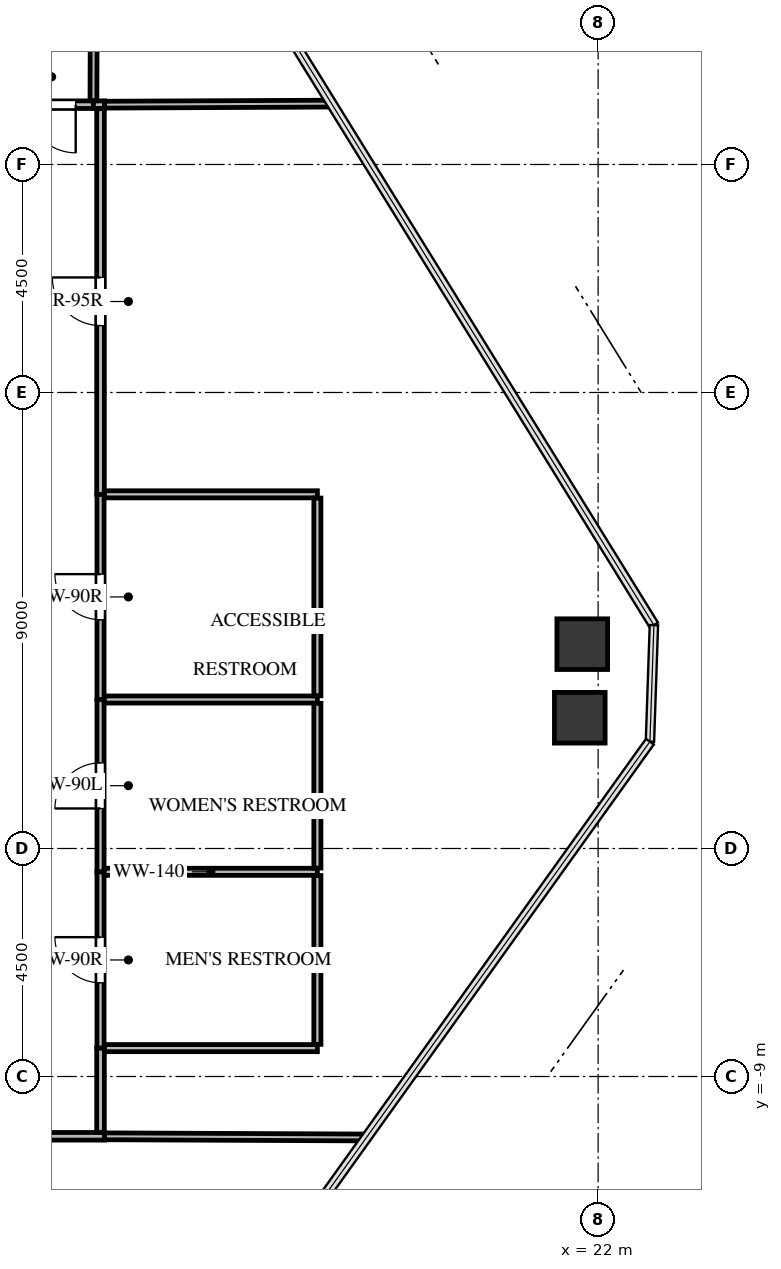
"""IFC4 building model, lengths in metres.
Left out: names, types, materials, properties, quantities, classifications, styles, units other than length and angle.
Written with IfcOpenShell. Run it as: python <this file> out.ifc"""

import sys

from ifc_helpers import new_model, si_unit, direction, frame, frame_2d, origin, origin_2d, place, context, subcontext, project, spatial, rectangle, extrude, source, transform, mapped, element, fill, save


model = new_model("IFC4")
c1 = context("Model", 3, precision=1e-05, world=origin(), true_north=direction((0.0, 1.0)))
c2 = subcontext(c1, "Body", "Model", "MODEL_VIEW")
j1 = project(units=[si_unit("LENGTHUNIT", "METRE"), si_unit("PLANEANGLEUNIT", "RADIAN")], contexts=[c1])
p1 = place(None, origin())
s1 = spatial("IfcSite", under=j1, at=p1, CompositionType="ELEMENT")
p2 = place(p1, origin())
s2 = spatial("IfcBuilding", under=s1, at=p2, CompositionType="ELEMENT")
p3 = place(p2, frame((0.0, 0.0, 209.2)))
s3 = spatial("IfcBuildingStorey", under=s2, at=p3, CompositionType="ELEMENT", Elevation=209.2)
m1 = source(origin(), c2, "Body", "SweptSolid", [
    extrude(rectangle(XDim=1.0, YDim=1.0, at=origin_2d()), origin(), (0.0, 0.0, 1.0), 4.14),
])
for number, where, z_axis, x_axis in (
    (1, (21.687, -0.467, -0.24), (0.0, 0.0, 1.0), (1.0, 0.0, 0.0)),
    (2, (21.638, -1.92, -0.24), (0.0, 0.0, 1.0), (1.0, 0.0, 0.0)),
):
    element("IfcColumn", number, at=place(p3, frame(where, z_axis=z_axis, x_axis=x_axis)), inside=s3, PredefinedType="COLUMN", context=c2, shape_type="MappedRepresentation", body=[
        mapped(m1, transform((0.0, 0.0, 0.0), x_axis=(1.0, 0.0, 0.0), y_axis=(0.0, 1.0, 0.0), z_axis=(0.0, 0.0, 1.0), scale=1.0)),
    ])
p4 = place(p3, frame((12.18, -8.44, 0.0), z_axis=(0.0, 0.0, 1.0), x_axis=(0.0, 1.0, 0.0)))
e3 = element("IfcWall", 3, at=p4, inside=s3, PredefinedType="PARTITIONING", context=c2, shape_type="SweptSolid", body=[
    extrude(rectangle(XDim=3.48, YDim=0.14, at=frame_2d((1.74, 0.0))), origin(), (0.0, 0.0, 1.0), 3.885),
])
p5 = place(p4, frame((1.29, 0.0, 0.0)))
e4 = element("IfcOpeningElement", 4, at=p5, cuts=e3, PredefinedType="OPENING", context=c2, shape_type="SweptSolid", body=[
    extrude(rectangle(XDim=0.9, YDim=2.05, at=frame_2d((0.45, 1.025))), frame((0.0, 0.08, 0.0), z_axis=(0.0, -1.0, 0.0), x_axis=(1.0, 0.0, 0.0)), (0.0, 0.0, 1.0), 0.16),
])
p6 = place(p3, frame((12.18, -4.96, 0.0), z_axis=(0.0, 0.0, 1.0), x_axis=(0.0, 1.0, 0.0)))
e5 = element("IfcWall", 5, at=p6, inside=s3, PredefinedType="PARTITIONING", context=c2, shape_type="SweptSolid", body=[
    extrude(rectangle(XDim=3.4, YDim=0.14, at=frame_2d((1.7, 0.0))), origin(), (0.0, 0.0, 1.0), 3.885),
])
p7 = place(p6, frame((1.25, 0.0, 0.0)))
e6 = element("IfcOpeningElement", 6, at=p7, cuts=e5, PredefinedType="OPENING", context=c2, shape_type="SweptSolid", body=[
    extrude(rectangle(XDim=0.9, YDim=2.05, at=frame_2d((0.45, 1.025))), frame((0.0, 0.08, 0.0), z_axis=(0.0, -1.0, 0.0), x_axis=(1.0, 0.0, 0.0)), (0.0, 0.0, 1.0), 0.16),
])
p8 = place(p3, frame((12.18, -1.56, 0.0), z_axis=(0.0, 0.0, 1.0), x_axis=(0.0, 1.0, 0.0)))
e7 = element("IfcWall", 7, at=p8, inside=s3, PredefinedType="PARTITIONING", context=c2, shape_type="SweptSolid", body=[
    extrude(rectangle(XDim=4.05, YDim=0.14, at=frame_2d((2.025, 0.0))), origin(), (0.0, 0.0, 1.0), 2.47),
])
p9 = place(p8, frame((1.575, 0.0, 0.0)))
e8 = element("IfcOpeningElement", 8, at=p9, cuts=e7, PredefinedType="OPENING", context=c2, shape_type="SweptSolid", body=[
    extrude(rectangle(XDim=0.9, YDim=2.05, at=frame_2d((0.45, 1.025))), frame((0.0, 0.08, 0.0), z_axis=(0.0, -1.0, 0.0), x_axis=(1.0, 0.0, 0.0)), (0.0, 0.0, 1.0), 0.16),
])
p10 = place(p3, frame((12.04, 10.18, 0.0), z_axis=(0.0, 0.0, 1.0), x_axis=(-1.0, 0.0, 0.0)))
e9 = element("IfcWall", 9, at=p10, inside=s3, PredefinedType="PARTITIONING", context=c2, shape_type="SweptSolid", body=[
    extrude(rectangle(XDim=4.8, YDim=0.15, at=frame_2d((2.4, 0.0))), origin(), (0.0, 0.0, 1.0), 2.47),
])
p11 = place(p10, frame((0.35, 0.0, 0.0)))
e10 = element("IfcOpeningElement", 10, at=p11, cuts=e9, PredefinedType="OPENING", context=c2, shape_type="SweptSolid", body=[
    extrude(rectangle(XDim=0.95, YDim=2.1, at=frame_2d((0.475, 1.05))), frame((0.0, 0.085, 0.0), z_axis=(0.0, -1.0, 0.0), x_axis=(1.0, 0.0, 0.0)), (0.0, 0.0, 1.0), 0.17),
])
p12 = place(p3, frame((12.26, 10.18, 0.0), z_axis=(0.0, 0.0, 1.0), x_axis=(-1.0, 0.0, 0.0)))
e11 = element("IfcWall", 11, at=p12, inside=s3, PredefinedType="PARTITIONING", context=c2, shape_type="SweptSolid", body=[
    extrude(rectangle(XDim=0.22, YDim=0.15, at=frame_2d((0.11, 0.0))), origin(), (0.0, 0.0, 1.0), 3.885),
])
p13 = place(p3, frame((5.04, -10.18, 0.0), z_axis=(0.0, 0.0, 1.0), x_axis=(1.0, 0.0, 0.0)))
e12 = element("IfcWall", 12, at=p13, inside=s3, PredefinedType="PARTITIONING", context=c2, shape_type="SweptSolid", body=[
    extrude(rectangle(XDim=7.22, YDim=0.15, at=frame_2d((3.61, 0.0))), origin(), (0.0, 0.0, 1.0), 2.47),
])
p14 = place(p13, frame((3.15, 0.0, 0.0)))
e13 = element("IfcOpeningElement", 13, at=p14, cuts=e12, PredefinedType="OPENING", context=c2, shape_type="SweptSolid", body=[
    extrude(rectangle(XDim=0.92, YDim=2.1, at=frame_2d((0.46, 1.05))), frame((0.0, 0.085, 0.0), z_axis=(0.0, -1.0, 0.0), x_axis=(1.0, 0.0, 0.0)), (0.0, 0.0, 1.0), 0.17),
])
p15 = place(p3, frame((12.18, 2.49, 0.0), z_axis=(0.0, 0.0, 1.0), x_axis=(0.0, 1.0, 0.0)))
e14 = element("IfcWall", 14, at=p15, inside=s3, PredefinedType="PARTITIONING", context=c2, shape_type="SweptSolid", body=[
    extrude(rectangle(XDim=7.611, YDim=0.15, at=frame_2d((3.806, 0.0))), origin(), (0.0, 0.0, 1.0), 3.885),
])
p16 = place(p15, frame((3.331, 0.0, 0.0)))
e15 = element("IfcOpeningElement", 15, at=p16, cuts=e14, PredefinedType="OPENING", context=c2, shape_type="SweptSolid", body=[
    extrude(rectangle(XDim=0.95, YDim=2.1, at=frame_2d((0.475, 1.05))), frame((0.0, 0.085, 0.0), z_axis=(0.0, -1.0, 0.0), x_axis=(1.0, 0.0, 0.0)), (0.0, 0.0, 1.0), 0.17),
])
p17 = place(p3, frame((12.18, -10.101, 0.0), z_axis=(0.0, 0.0, 1.0), x_axis=(0.0, 1.0, 0.0)))
e16 = element("IfcWall", 16, at=p17, inside=s3, PredefinedType="PARTITIONING", context=c2, shape_type="SweptSolid", body=[
    extrude(rectangle(XDim=1.661, YDim=0.15, at=frame_2d((0.831, 0.0))), origin(), (0.0, 0.0, 1.0), 3.885),
])
p18 = place(p3, frame((12.254, -4.96, 0.0), z_axis=(0.0, 0.0, 1.0), x_axis=(1.0, 0.0, 0.0)))
e17 = element("IfcWall", 17, at=p18, inside=s3, PredefinedType="PARTITIONING", context=c2, shape_type="SweptSolid", body=[
    extrude(rectangle(XDim=4.206, YDim=0.14, at=frame_2d((2.103, 0.0))), origin(), (0.0, 0.0, 1.0), 3.885),
])
p19 = place(p3, frame((16.46, -8.44, 0.0), z_axis=(0.0, 0.0, 1.0), x_axis=(-1.0, 0.0, 0.0)))
e18 = element("IfcWall", 18, at=p19, inside=s3, PredefinedType="PARTITIONING", context=c2, shape_type="SweptSolid", body=[
    extrude(rectangle(XDim=4.201, YDim=0.14, at=frame_2d((2.101, 0.0))), origin(), (0.0, 0.0, 1.0), 2.47),
])
p20 = place(p3, frame((16.46, -5.034, 0.0), z_axis=(0.0, 0.0, 1.0), x_axis=(0.0, -1.0, 0.0)))
e19 = element("IfcWall", 19, at=p20, inside=s3, PredefinedType="PARTITIONING", context=c2, shape_type="SweptSolid", body=[
    extrude(rectangle(XDim=3.332, YDim=0.14, at=frame_2d((1.666, 0.0))), origin(), (0.0, 0.0, 1.0), 2.47),
])
p21 = place(p3, frame((12.254, -1.56, 0.0), z_axis=(0.0, 0.0, 1.0), x_axis=(1.0, 0.0, 0.0)))
e20 = element("IfcWall", 20, at=p21, inside=s3, PredefinedType="PARTITIONING", context=c2, shape_type="SweptSolid", body=[
    extrude(rectangle(XDim=4.206, YDim=0.14, at=frame_2d((2.103, 0.0))), origin(), (0.0, 0.0, 1.0), 2.47),
])
p22 = place(p3, frame((16.46, -1.634, 0.0), z_axis=(0.0, 0.0, 1.0), x_axis=(0.0, -1.0, 0.0)))
e21 = element("IfcWall", 21, at=p22, inside=s3, PredefinedType="PARTITIONING", context=c2, shape_type="SweptSolid", body=[
    extrude(rectangle(XDim=3.252, YDim=0.14, at=frame_2d((1.626, 0.0))), origin(), (0.0, 0.0, 1.0), 2.47),
])
p23 = place(p3, frame((12.259, 2.49, 0.0), z_axis=(0.0, 0.0, 1.0), x_axis=(1.0, 0.0, 0.0)))
e22 = element("IfcWall", 22, at=p23, inside=s3, PredefinedType="PARTITIONING", context=c2, shape_type="SweptSolid", body=[
    extrude(rectangle(XDim=4.201, YDim=0.14, at=frame_2d((2.101, 0.0))), origin(), (0.0, 0.0, 1.0), 3.885),
])
p24 = place(p3, frame((16.46, 2.416, 0.0), z_axis=(0.0, 0.0, 1.0), x_axis=(0.0, -1.0, 0.0)))
e23 = element("IfcWall", 23, at=p24, inside=s3, PredefinedType="PARTITIONING", context=c2, shape_type="SweptSolid", body=[
    extrude(rectangle(XDim=3.902, YDim=0.14, at=frame_2d((1.951, 0.0))), origin(), (0.0, 0.0, 1.0), 2.47),
])
p25 = place(p3, frame((12.06, 16.151, 0.0), z_axis=(0.0, 0.0, 1.0), x_axis=(-0.003273237074, -0.999994642945, 0.0)))
e24 = element("IfcWall", 24, at=p25, inside=s3, PredefinedType="PARTITIONING", context=c2, shape_type="SweptSolid", body=[
    extrude(rectangle(XDim=5.892, YDim=0.135, at=frame_2d((2.946, 0.0))), origin(), (0.0, 0.0, 1.0), 2.47),
])
p26 = place(p25, frame((3.89, 0.0, 0.0)))
e25 = element("IfcOpeningElement", 25, at=p26, cuts=e24, PredefinedType="OPENING", context=c2, shape_type="SweptSolid", body=[
    extrude(rectangle(XDim=0.9, YDim=2.05, at=frame_2d((0.45, 1.025))), frame((0.0, 0.078, 0.0), z_axis=(0.0, -1.0, 0.0), x_axis=(1.0, 0.0, 0.0)), (0.0, 0.0, 1.0), 0.155),
])
p27 = place(p3, frame((16.74, 10.201, 0.0), z_axis=(0.0, 0.0, 1.0), x_axis=(-0.999989522694, -0.004577608714, 0.0)))
e26 = element("IfcWall", 26, at=p27, inside=s3, PredefinedType="PARTITIONING", context=c2, shape_type="SweptSolid", body=[
    extrude(rectangle(XDim=4.48, YDim=0.135, at=frame_2d((2.24, 0.0))), origin(), (0.0, 0.0, 1.0), 2.47),
])
p28 = place(p3, frame((12.26, -10.18, 0.0), z_axis=(0.0, 0.0, 1.0), x_axis=(0.999990144117, -0.004439782427, 0.0)))
e27 = element("IfcWall", 27, at=p28, inside=s3, PredefinedType="PARTITIONING", context=c2, shape_type="SweptSolid", body=[
    extrude(rectangle(XDim=5.169, YDim=0.135, at=frame_2d((2.584, 0.0))), origin(), (0.0, 0.0, 1.0), 2.47),
])
m2 = source(origin(), c2, "Body", "SweptSolid", [
    extrude(rectangle(XDim=0.9, YDim=2.05, at=frame_2d((0.45, 1.025))), frame((0.0, 0.025, 0.0), z_axis=(0.0, -1.0, 0.0), x_axis=(1.0, 0.0, 0.0)), (0.0, 0.0, 1.0), 0.05),
])
p29 = place(p5, origin())
e28 = element("IfcDoor", 28, at=p29, inside=s3, OperationType="SINGLE_SWING_RIGHT", PredefinedType="DOOR", context=c2, shape_type="MappedRepresentation", body=[
    mapped(m2, transform((0.0, 0.0, 0.0), x_axis=(1.0, 0.0, 0.0), y_axis=(0.0, 1.0, 0.0), z_axis=(0.0, 0.0, 1.0), scale=1.0)),
])
fill(e4, e28)
m3 = source(origin(), c2, "Body", "SweptSolid", [
    extrude(rectangle(XDim=0.9, YDim=2.05, at=frame_2d((0.45, 1.025))), frame((0.0, 0.025, 0.0), z_axis=(0.0, -1.0, 0.0), x_axis=(1.0, 0.0, 0.0)), (0.0, 0.0, 1.0), 0.05),
])
p30 = place(p7, origin())
e29 = element("IfcDoor", 29, at=p30, inside=s3, OperationType="SINGLE_SWING_LEFT", PredefinedType="DOOR", context=c2, shape_type="MappedRepresentation", body=[
    mapped(m3, transform((0.0, 0.0, 0.0), x_axis=(1.0, 0.0, 0.0), y_axis=(0.0, 1.0, 0.0), z_axis=(0.0, 0.0, 1.0), scale=1.0)),
])
fill(e6, e29)
p31 = place(p9, origin())
e30 = element("IfcDoor", 30, at=p31, inside=s3, OperationType="SINGLE_SWING_RIGHT", PredefinedType="DOOR", context=c2, shape_type="MappedRepresentation", body=[
    mapped(m2, transform((0.0, 0.0, 0.0), x_axis=(1.0, 0.0, 0.0), y_axis=(0.0, 1.0, 0.0), z_axis=(0.0, 0.0, 1.0), scale=1.0)),
])
fill(e8, e30)
m4 = source(origin(), c2, "Body", "SweptSolid", [
    extrude(rectangle(XDim=0.95, YDim=2.1, at=frame_2d((0.475, 1.05))), frame((0.0, 0.025, 0.0), z_axis=(0.0, -1.0, 0.0), x_axis=(1.0, 0.0, 0.0)), (0.0, 0.0, 1.0), 0.05),
])
p32 = place(p11, origin())
e31 = element("IfcDoor", 31, at=p32, inside=s3, OperationType="SINGLE_SWING_LEFT", PredefinedType="DOOR", context=c2, shape_type="MappedRepresentation", body=[
    mapped(m4, transform((0.0, 0.0, 0.0), x_axis=(1.0, 0.0, 0.0), y_axis=(0.0, 1.0, 0.0), z_axis=(0.0, 0.0, 1.0), scale=1.0)),
])
fill(e10, e31)
m5 = source(origin(), c2, "Body", "SweptSolid", [
    extrude(rectangle(XDim=0.95, YDim=2.1, at=frame_2d((0.475, 1.05))), frame((0.0, 0.025, 0.0), z_axis=(0.0, -1.0, 0.0), x_axis=(1.0, 0.0, 0.0)), (0.0, 0.0, 1.0), 0.05),
])
p33 = place(p16, origin())
e32 = element("IfcDoor", 32, at=p33, inside=s3, OperationType="SINGLE_SWING_RIGHT", PredefinedType="DOOR", context=c2, shape_type="MappedRepresentation", body=[
    mapped(m5, transform((0.0, 0.0, 0.0), x_axis=(1.0, 0.0, 0.0), y_axis=(0.0, 1.0, 0.0), z_axis=(0.0, 0.0, 1.0), scale=1.0)),
])
fill(e15, e32)
save(model, sys.argv[1])
